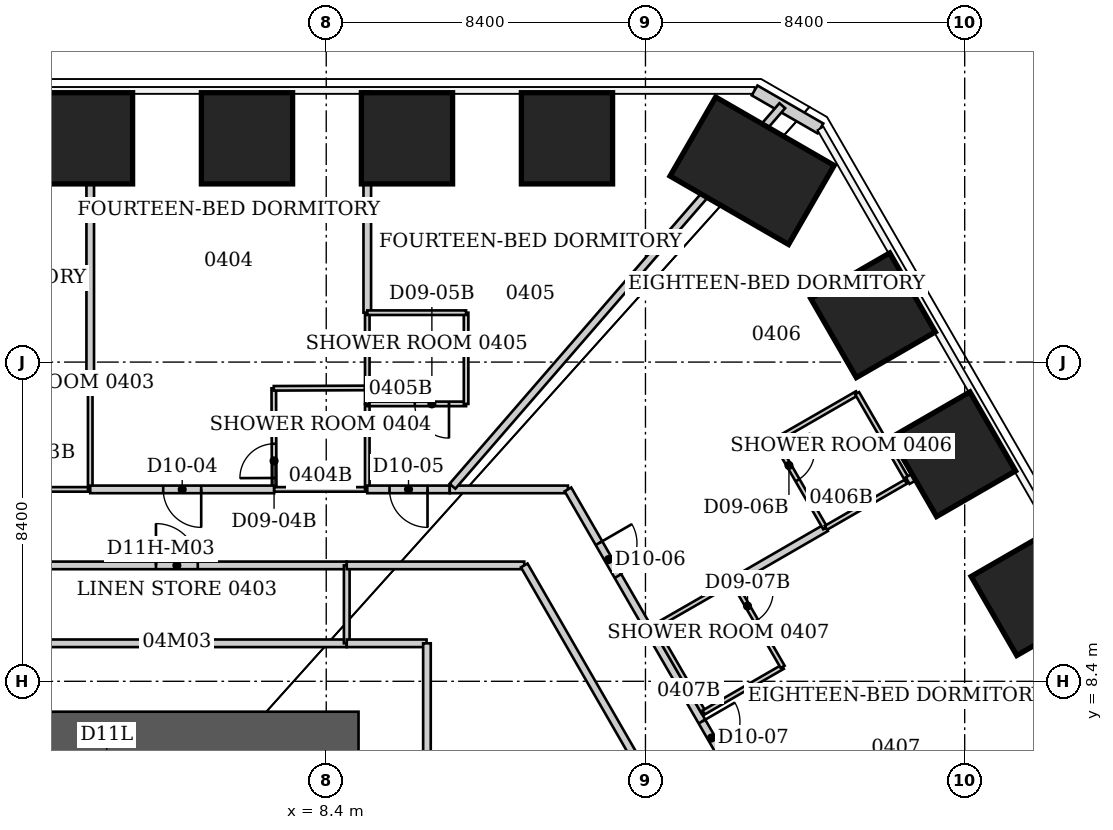
"""IFC4 building model, lengths in metres.
Left out: names, types, materials, properties, quantities, classifications, styles, units other than length and angle.
Written with IfcOpenShell. Run it as: python <this file> out.ifc"""

import sys

from ifc_helpers import new_model, si_unit, direction, frame, frame_2d, origin, origin_2d, place, context, subcontext, project, spatial, rectangle, extrude, element, fill, save


model = new_model("IFC4")
c1 = context("Model", 3, precision=1e-05, world=origin(), true_north=direction((0.0, 1.0)))
c2 = subcontext(c1, "Body", "Model", "MODEL_VIEW")
j1 = project(units=[si_unit("LENGTHUNIT", "METRE"), si_unit("PLANEANGLEUNIT", "RADIAN")], contexts=[c1])
p1 = place(None, origin())
s1 = spatial("IfcSite", under=j1, at=p1, CompositionType="ELEMENT")
p2 = place(p1, origin())
s2 = spatial("IfcBuilding", under=s1, at=p2, CompositionType="ELEMENT")
p3 = place(p2, frame((0.0, 0.0, 23.0)))
s3 = spatial("IfcBuildingStorey", under=s2, at=p3, CompositionType="ELEMENT", Elevation=23.0)
for number, where, z_axis, x_axis in (
    (1, (2.105, 22.689, 0.0), (0.0, 0.0, 1.0), (0.0, 1.0, 0.0)),
    (2, (6.315, 22.689, 0.0), (0.0, 0.0, 1.0), (0.0, 1.0, 0.0)),
    (3, (10.525, 22.689, 0.0), (0.0, 0.0, 1.0), (0.0, 1.0, 0.0)),
    (4, (14.735, 22.689, 0.0), (0.0, 0.0, 1.0), (0.0, 1.0, 0.0)),
):
    element("IfcColumn", number, at=place(p3, frame(where, z_axis=z_axis, x_axis=x_axis)), inside=s3, PredefinedType="COLUMN", context=c2, shape_type="SweptSolid", body=[
        extrude(rectangle(XDim=2.4, YDim=2.4, at=origin_2d()), origin(), (0.0, 0.0, 1.0), 3.8),
    ])
p4 = place(p3, frame((19.606, 21.835, 0.0), z_axis=(0.0, 0.0, 1.0), x_axis=(0.5, 0.866025403784, 0.0)))
e5 = element("IfcColumn", 5, at=p4, inside=s3, PredefinedType="COLUMN", context=c2, shape_type="SweptSolid", body=[
    extrude(rectangle(XDim=2.4, YDim=3.6, at=origin_2d()), origin(), (0.0, 0.0, 1.0), 3.8),
])
for number, where, z_axis, x_axis in (
    (6, (22.788, 18.032, 0.0), (0.0, 0.0, 1.0), (0.866, 0.5, 0.0)),
    (7, (24.899, 14.375, 0.0), (0.0, 0.0, 1.0), (0.866, 0.5, 0.0)),
    (8, (27.01, 10.719, 0.0), (0.0, 0.0, 1.0), (0.866, 0.5, 0.0)),
):
    element("IfcColumn", number, at=place(p3, frame(where, z_axis=z_axis, x_axis=x_axis)), inside=s3, PredefinedType="COLUMN", context=c2, shape_type="SweptSolid", body=[
        extrude(rectangle(XDim=2.4, YDim=2.4, at=origin_2d()), origin(), (0.0, 0.0, 1.0), 3.8),
    ])
p5 = place(p3, frame((-9.25, 6.85, 0.0), z_axis=(0.0, 0.0, 1.0), x_axis=(1.0, 0.0, 0.0)))
e9 = element("IfcWall", 9, at=p5, inside=s3, PredefinedType="SHEAR", context=c2, shape_type="SweptSolid", body=[
    extrude(rectangle(XDim=18.5, YDim=1.5, at=frame_2d((9.25, 0.0))), origin(), (0.0, 0.0, 1.0), 3.8),
])
p6 = place(p3, frame((19.672, 23.949, 0.0), z_axis=(0.0, 0.0, 1.0), x_axis=(0.866010750942, -0.50002537861, 0.0)))
e10 = element("IfcWall", 10, at=p6, inside=s3, PredefinedType="SOLIDWALL", context=c2, shape_type="SweptSolid", body=[
    extrude(rectangle(XDim=2.0, YDim=0.3, at=frame_2d((1.0, 0.0))), origin(), (0.0, 0.0, 1.0), 3.64),
])
p7 = place(p3, frame((0.0, 11.45, 0.0), z_axis=(0.0, 0.0, 1.0), x_axis=(1.0, 0.0, 0.0)))
e11 = element("IfcWall", 11, at=p7, inside=s3, PredefinedType="PARTITIONING", context=c2, shape_type="SweptSolid", body=[
    extrude(rectangle(XDim=8.94, YDim=0.2, at=frame_2d((4.47, 0.0))), origin(), (0.0, 0.0, 1.0), 3.64),
])
p8 = place(p7, frame((3.92, 0.0, 0.0)))
e12 = element("IfcOpeningElement", 12, at=p8, cuts=e11, PredefinedType="OPENING", context=c2, shape_type="SweptSolid", body=[
    extrude(rectangle(XDim=1.1, YDim=2.2, at=frame_2d((0.55, 1.1))), frame((0.0, 0.1, 0.0), z_axis=(0.0, -1.0, 0.0), x_axis=(1.0, 0.0, 0.0)), (0.0, 0.0, 1.0), 0.2),
])
for number, where, z_axis, x_axis in (
    (13, (2.19, 13.45, 0.0), (0.0, 0.0, 1.0), (-1.0, 0.0, 0.0)),
    (14, (2.19, 16.12, 0.0), (0.0, 0.0, 1.0), (-1.0, 0.0, 0.0)),
):
    element("IfcWall", number, at=place(p3, frame(where, z_axis=z_axis, x_axis=x_axis)), inside=s3, PredefinedType="PARTITIONING", context=c2, shape_type="SweptSolid", body=[
        extrude(rectangle(XDim=2.46, YDim=0.12, at=frame_2d((1.23, 0.0))), origin(), (0.0, 0.0, 1.0), 3.64),
    ])
p9 = place(p3, frame((2.19, 16.12, 0.0), z_axis=(0.0, 0.0, 1.0), x_axis=(0.0, -1.0, 0.0)))
e15 = element("IfcWall", 15, at=p9, inside=s3, PredefinedType="PARTITIONING", context=c2, shape_type="SweptSolid", body=[
    extrude(rectangle(XDim=2.67, YDim=0.12, at=frame_2d((1.335, 0.0))), origin(), (0.0, 0.0, 1.0), 2.878),
])
p10 = place(p3, frame((2.19, 23.83, 0.0), z_axis=(0.0, 0.0, 1.0), x_axis=(0.0, -1.0, 0.0)))
e16 = element("IfcWall", 16, at=p10, inside=s3, PredefinedType="PARTITIONING", context=c2, shape_type="SweptSolid", body=[
    extrude(rectangle(XDim=7.71, YDim=0.2, at=frame_2d((3.855, 0.0))), origin(), (0.0, 0.0, 1.0), 2.878),
])
p11 = place(p3, frame((7.02, 16.11, 0.0), z_axis=(0.0, 0.0, 1.0), x_axis=(0.003762822113, -0.99999292056, 0.0)))
e17 = element("IfcWall", 17, at=p11, inside=s3, PredefinedType="PARTITIONING", context=c2, shape_type="SweptSolid", body=[
    extrude(rectangle(XDim=2.66, YDim=0.12, at=frame_2d((1.33, 0.0))), origin(), (0.0, 0.0, 1.0), 3.64),
])
p12 = place(p11, frame((1.46, 0.0, 0.0)))
e18 = element("IfcOpeningElement", 18, at=p12, cuts=e17, PredefinedType="OPENING", context=c2, shape_type="SweptSolid", body=[
    extrude(rectangle(XDim=0.9, YDim=2.03, at=frame_2d((0.45, 1.015))), frame((0.0, 0.06, 0.0), z_axis=(0.0, -1.0, 0.0), x_axis=(1.0, 0.0, 0.0)), (0.0, 0.0, 1.0), 0.12),
])
p13 = place(p3, frame((7.03, 13.45, 0.0), z_axis=(0.0, 0.0, 1.0), x_axis=(-1.0, 0.0, 0.0)))
e19 = element("IfcWall", 19, at=p13, inside=s3, PredefinedType="PARTITIONING", context=c2, shape_type="SweptSolid", body=[
    extrude(rectangle(XDim=4.84, YDim=0.2, at=frame_2d((2.42, 0.0))), origin(), (0.0, 0.0, 1.0), 3.64),
])
p14 = place(p13, frame((1.92, 0.0, 0.0)))
e20 = element("IfcOpeningElement", 20, at=p14, cuts=e19, PredefinedType="OPENING", context=c2, shape_type="SweptSolid", body=[
    extrude(rectangle(XDim=1.0, YDim=2.13, at=frame_2d((0.5, 1.065))), frame((0.0, 0.1, 0.0), z_axis=(0.0, -1.0, 0.0), x_axis=(1.0, 0.0, 0.0)), (0.0, 0.0, 1.0), 0.2),
])
p15 = place(p3, frame((8.94, 9.4, 0.0), z_axis=(0.0, 0.0, 1.0), x_axis=(-1.0, 0.0, 0.0)))
e21 = element("IfcWall", 21, at=p15, inside=s3, PredefinedType="PARTITIONING", context=c2, shape_type="SweptSolid", body=[
    extrude(rectangle(XDim=8.94, YDim=0.2, at=frame_2d((4.47, 0.0))), origin(), (0.0, 0.0, 1.0), 3.64),
])
p16 = place(p3, frame((8.94, 11.45, 0.0), z_axis=(0.0, 0.0, 1.0), x_axis=(0.0, -1.0, 0.0)))
e22 = element("IfcWall", 22, at=p16, inside=s3, PredefinedType="PARTITIONING", context=c2, shape_type="SweptSolid", body=[
    extrude(rectangle(XDim=2.05, YDim=0.15, at=frame_2d((1.025, 0.0))), origin(), (0.0, 0.0, 1.0), 3.64),
])
p17 = place(p3, frame((8.94, 11.45, 0.0), z_axis=(0.0, 0.0, 1.0), x_axis=(1.0, 0.0, 0.0)))
e23 = element("IfcWall", 23, at=p17, inside=s3, PredefinedType="PARTITIONING", context=c2, shape_type="SweptSolid", body=[
    extrude(rectangle(XDim=4.67, YDim=0.2, at=frame_2d((2.335, 0.0))), origin(), (0.0, 0.0, 1.0), 3.64),
])
p18 = place(p3, frame((9.48, 13.45, 0.0), z_axis=(0.0, 0.0, 1.0), x_axis=(-1.0, 0.0, 0.0)))
e24 = element("IfcWall", 24, at=p18, inside=s3, PredefinedType="PARTITIONING", context=c2, shape_type="SweptSolid", body=[
    extrude(rectangle(XDim=2.45, YDim=0.12, at=frame_2d((1.225, 0.0))), origin(), (0.0, 0.0, 1.0), 3.64),
])
p19 = place(p3, frame((9.48, 15.7, 0.0), z_axis=(0.0, 0.0, 1.0), x_axis=(0.0, -1.0, 0.0)))
e25 = element("IfcWall", 25, at=p19, inside=s3, PredefinedType="PARTITIONING", context=c2, shape_type="SweptSolid", body=[
    extrude(rectangle(XDim=2.25, YDim=0.12, at=frame_2d((1.125, 0.0))), origin(), (0.0, 0.0, 1.0), 3.64),
])
p20 = place(p3, frame((9.48, 15.7, 0.0), z_axis=(0.0, 0.0, 1.0), x_axis=(1.0, 0.0, 0.0)))
e26 = element("IfcWall", 26, at=p20, inside=s3, PredefinedType="PARTITIONING", context=c2, shape_type="SweptSolid", body=[
    extrude(rectangle(XDim=2.6, YDim=0.12, at=frame_2d((1.3, 0.0))), origin(), (0.0, 0.0, 1.0), 3.64),
])
p21 = place(p20, frame((1.25, 0.0, 0.0)))
e27 = element("IfcOpeningElement", 27, at=p21, cuts=e26, PredefinedType="OPENING", context=c2, shape_type="SweptSolid", body=[
    extrude(rectangle(XDim=0.9, YDim=2.03, at=frame_2d((0.45, 1.015))), frame((0.0, 0.06, 0.0), z_axis=(0.0, -1.0, 0.0), x_axis=(1.0, 0.0, 0.0)), (0.0, 0.0, 1.0), 0.12),
])
p22 = place(p3, frame((9.48, 16.12, 0.0), z_axis=(0.0, 0.0, 1.0), x_axis=(-0.999991721417, -0.004069041344, 0.0)))
e28 = element("IfcWall", 28, at=p22, inside=s3, PredefinedType="PARTITIONING", context=c2, shape_type="SweptSolid", body=[
    extrude(rectangle(XDim=2.46, YDim=0.12, at=frame_2d((1.23, 0.0))), origin(), (0.0, 0.0, 1.0), 3.64),
])
p23 = place(p3, frame((9.48, 16.12, 0.0), z_axis=(0.0, 0.0, 1.0), x_axis=(0.0, -1.0, 0.0)))
e29 = element("IfcWall", 29, at=p23, inside=s3, PredefinedType="PARTITIONING", context=c2, shape_type="SweptSolid", body=[
    extrude(rectangle(XDim=0.42, YDim=0.12, at=frame_2d((0.21, 0.0))), origin(), (0.0, 0.0, 1.0), 3.64),
])
p24 = place(p3, frame((9.48, 18.1, 0.0), z_axis=(0.0, 0.0, 1.0), x_axis=(0.0, -1.0, 0.0)))
e30 = element("IfcWall", 30, at=p24, inside=s3, PredefinedType="PARTITIONING", context=c2, shape_type="SweptSolid", body=[
    extrude(rectangle(XDim=1.98, YDim=0.12, at=frame_2d((0.99, 0.0))), origin(), (0.0, 0.0, 1.0), 3.64),
])
p25 = place(p3, frame((9.48, 23.92, 0.0), z_axis=(0.0, 0.0, 1.0), x_axis=(0.0, -1.0, 0.0)))
e31 = element("IfcWall", 31, at=p25, inside=s3, PredefinedType="PARTITIONING", context=c2, shape_type="SweptSolid", body=[
    extrude(rectangle(XDim=5.82, YDim=0.2, at=frame_2d((2.91, 0.0))), origin(), (0.0, 0.0, 1.0), 3.64),
])
p26 = place(p3, frame((11.04, 9.4, 0.0), z_axis=(0.0, 0.0, 1.0), x_axis=(-1.0, 0.0, 0.0)))
e32 = element("IfcWall", 32, at=p26, inside=s3, PredefinedType="PARTITIONING", context=c2, shape_type="SweptSolid", body=[
    extrude(rectangle(XDim=2.1, YDim=0.2, at=frame_2d((1.05, 0.0))), origin(), (0.0, 0.0, 1.0), 3.64),
])
p27 = place(p3, frame((11.05, -7.76, 0.0), z_axis=(0.0, 0.0, 1.0), x_axis=(0.0, 1.0, 0.0)))
e33 = element("IfcWall", 33, at=p27, inside=s3, PredefinedType="PARTITIONING", context=c2, shape_type="SweptSolid", body=[
    extrude(rectangle(XDim=17.16, YDim=0.2, at=frame_2d((8.58, 0.0))), origin(), (0.0, 0.0, 1.0), 3.64),
])
p28 = place(p27, frame((8.03, 0.0, 0.0)))
e34 = element("IfcOpeningElement", 34, at=p28, cuts=e33, PredefinedType="OPENING", context=c2, shape_type="SweptSolid", body=[
    extrude(rectangle(XDim=1.1, YDim=2.2, at=frame_2d((0.55, 1.1))), frame((0.0, 0.1, 0.0), z_axis=(0.0, -1.0, 0.0), x_axis=(1.0, 0.0, 0.0)), (0.0, 0.0, 1.0), 0.2),
])
p29 = place(p3, frame((11.65, 13.45, 0.0), z_axis=(0.0, 0.0, 1.0), x_axis=(-1.0, 0.0, 0.0)))
e35 = element("IfcWall", 35, at=p29, inside=s3, PredefinedType="PARTITIONING", context=c2, shape_type="SweptSolid", body=[
    extrude(rectangle(XDim=2.17, YDim=0.2, at=frame_2d((1.085, 0.0))), origin(), (0.0, 0.0, 1.0), 3.64),
])
p30 = place(p29, frame((0.585, 0.0, 0.0)))
e36 = element("IfcOpeningElement", 36, at=p30, cuts=e35, PredefinedType="OPENING", context=c2, shape_type="SweptSolid", body=[
    extrude(rectangle(XDim=1.0, YDim=2.13, at=frame_2d((0.5, 1.065))), frame((0.0, 0.1, 0.0), z_axis=(0.0, -1.0, 0.0), x_axis=(1.0, 0.0, 0.0)), (0.0, 0.0, 1.0), 0.2),
])
p31 = place(p3, frame((12.08, 15.7, 0.0), z_axis=(0.0, 0.0, 1.0), x_axis=(0.0, 1.0, 0.0)))
e37 = element("IfcWall", 37, at=p31, inside=s3, PredefinedType="PARTITIONING", context=c2, shape_type="SweptSolid", body=[
    extrude(rectangle(XDim=2.4, YDim=0.12, at=frame_2d((1.2, 0.0))), origin(), (0.0, 0.0, 1.0), 3.64),
])
p32 = place(p3, frame((12.08, 18.1, 0.0), z_axis=(0.0, 0.0, 1.0), x_axis=(-1.0, 0.0, 0.0)))
e38 = element("IfcWall", 38, at=p32, inside=s3, PredefinedType="PARTITIONING", context=c2, shape_type="SweptSolid", body=[
    extrude(rectangle(XDim=2.6, YDim=0.12, at=frame_2d((1.3, 0.0))), origin(), (0.0, 0.0, 1.0), 3.64),
])
p33 = place(p3, frame((13.61, 11.45, 0.0), z_axis=(0.0, 0.0, 1.0), x_axis=(0.499402776741, -0.866369936334, 0.0)))
e39 = element("IfcWall", 39, at=p33, inside=s3, PredefinedType="PARTITIONING", context=c2, shape_type="SweptSolid", body=[
    extrude(rectangle(XDim=8.53, YDim=0.2, at=frame_2d((4.265, 0.0))), origin(), (0.0, 0.0, 1.0), 3.64),
])
p34 = place(p3, frame((14.76, 13.45, 0.0), z_axis=(0.0, 0.0, 1.0), x_axis=(-1.0, 0.0, 0.0)))
e40 = element("IfcWall", 40, at=p34, inside=s3, PredefinedType="PARTITIONING", context=c2, shape_type="SweptSolid", body=[
    extrude(rectangle(XDim=3.11, YDim=0.2, at=frame_2d((1.555, 0.0))), origin(), (0.0, 0.0, 1.0), 3.64),
])
p35 = place(p3, frame((14.76, 13.45, 0.0), z_axis=(0.0, 0.0, 1.0), x_axis=(0.499894213467, -0.866086471054, 0.0)))
e41 = element("IfcWall", 41, at=p35, inside=s3, PredefinedType="PARTITIONING", context=c2, shape_type="SweptSolid", body=[
    extrude(rectangle(XDim=4.266, YDim=0.2, at=frame_2d((2.133, 0.0))), origin(), (0.0, 0.0, 1.0), 3.64),
])
p36 = place(p35, frame((1.633, 0.0, 0.0)))
e42 = element("IfcOpeningElement", 42, at=p36, cuts=e41, PredefinedType="OPENING", context=c2, shape_type="SweptSolid", body=[
    extrude(rectangle(XDim=1.0, YDim=2.13, at=frame_2d((0.5, 1.065))), frame((0.0, 0.1, 0.0), z_axis=(0.0, -1.0, 0.0), x_axis=(1.0, 0.0, 0.0)), (0.0, 0.0, 1.0), 0.2),
])
p37 = place(p3, frame((16.892, 9.756, 0.0), z_axis=(0.0, 0.0, 1.0), x_axis=(0.499916344562, -0.866073696887, 0.0)))
e43 = element("IfcWall", 43, at=p37, inside=s3, PredefinedType="PARTITIONING", context=c2, shape_type="SweptSolid", body=[
    extrude(rectangle(XDim=6.576, YDim=0.2, at=frame_2d((3.288, 0.0))), origin(), (0.0, 0.0, 1.0), 3.64),
])
p38 = place(p37, frame((2.788, 0.0, 0.0)))
e44 = element("IfcOpeningElement", 44, at=p38, cuts=e43, PredefinedType="OPENING", context=c2, shape_type="SweptSolid", body=[
    extrude(rectangle(XDim=1.0, YDim=2.13, at=frame_2d((0.5, 1.065))), frame((0.0, 0.1, 0.0), z_axis=(0.0, -1.0, 0.0), x_axis=(1.0, 0.0, 0.0)), (0.0, 0.0, 1.0), 0.2),
])
p39 = place(p3, frame((16.904, 9.762, 0.0), z_axis=(0.0, 0.0, 1.0), x_axis=(0.875926787791, 0.482444051088, 0.0)))
e45 = element("IfcWall", 45, at=p39, inside=s3, PredefinedType="PARTITIONING", context=c2, shape_type="SweptSolid", body=[
    extrude(rectangle(XDim=0.143, YDim=0.2, at=frame_2d((0.071, 0.0))), origin(), (0.0, 0.0, 1.0), 3.64),
])
p40 = place(p3, frame((17.028, 9.834, 0.0), z_axis=(0.0, 0.0, 1.0), x_axis=(0.867064427496, 0.498196024242, 0.0)))
e46 = element("IfcWall", 46, at=p40, inside=s3, PredefinedType="PARTITIONING", context=c2, shape_type="SweptSolid", body=[
    extrude(rectangle(XDim=2.401, YDim=0.12, at=frame_2d((1.201, 0.0))), origin(), (0.0, 0.0, 1.0), 2.86),
])
p41 = place(p3, frame((17.03, 9.83, 0.0), z_axis=(0.0, 0.0, 1.0), x_axis=(0.500291685314, -0.865856933682, 0.0)))
e47 = element("IfcWall", 47, at=p41, inside=s3, PredefinedType="PARTITIONING", context=c2, shape_type="SweptSolid", body=[
    extrude(rectangle(XDim=2.599, YDim=0.12, at=frame_2d((1.299, 0.0))), origin(), (0.0, 0.0, 1.0), 3.64),
])
p42 = place(p3, frame((18.33, 7.58, 0.0), z_axis=(0.0, 0.0, 1.0), x_axis=(0.866177122335, 0.499737123639, 0.0)))
e48 = element("IfcWall", 48, at=p42, inside=s3, PredefinedType="PARTITIONING", context=c2, shape_type="SweptSolid", body=[
    extrude(rectangle(XDim=2.401, YDim=0.12, at=frame_2d((1.201, 0.0))), origin(), (0.0, 0.0, 1.0), 3.64),
])
p43 = place(p3, frame((19.11, 11.03, 0.0), z_axis=(0.0, 0.0, 1.0), x_axis=(0.865839219242, 0.500322342518, 0.0)))
e49 = element("IfcWall", 49, at=p43, inside=s3, PredefinedType="PARTITIONING", context=c2, shape_type="SweptSolid", body=[
    extrude(rectangle(XDim=2.818, YDim=0.2, at=frame_2d((1.409, 0.0))), origin(), (0.0, 0.0, 1.0), 2.86),
])
p44 = place(p3, frame((20.2, 14.73, 0.0), z_axis=(0.0, 0.0, 1.0), x_axis=(0.500605174168, -0.865675724273, 0.0)))
e50 = element("IfcWall", 50, at=p44, inside=s3, PredefinedType="PARTITIONING", context=c2, shape_type="SweptSolid", body=[
    extrude(rectangle(XDim=2.657, YDim=0.12, at=frame_2d((1.329, 0.0))), origin(), (0.0, 0.0, 1.0), 3.64),
])
p45 = place(p44, frame((0.3, 0.0, 0.0)))
e51 = element("IfcOpeningElement", 51, at=p45, cuts=e50, PredefinedType="OPENING", context=c2, shape_type="SweptSolid", body=[
    extrude(rectangle(XDim=0.9, YDim=2.03, at=frame_2d((0.45, 1.015))), frame((0.0, 0.06, 0.0), z_axis=(0.0, -1.0, 0.0), x_axis=(1.0, 0.0, 0.0)), (0.0, 0.0, 1.0), 0.12),
])
p46 = place(p3, frame((20.4, 23.547, 0.0), z_axis=(0.0, 0.0, 1.0), x_axis=(-0.654899675326, -0.7557158297, 0.0)))
e52 = element("IfcWall", 52, at=p46, inside=s3, PredefinedType="PARTITIONING", context=c2, shape_type="SweptSolid", body=[
    extrude(rectangle(XDim=13.251, YDim=0.2, at=frame_2d((6.625, 0.0))), origin(), (0.0, 0.0, 1.0), 3.64),
])
p47 = place(p3, frame((20.41, 8.78, 0.0), z_axis=(0.0, 0.0, 1.0), x_axis=(-0.500291685314, 0.865856933682, 0.0)))
e53 = element("IfcWall", 53, at=p47, inside=s3, PredefinedType="PARTITIONING", context=c2, shape_type="SweptSolid", body=[
    extrude(rectangle(XDim=2.599, YDim=0.12, at=frame_2d((1.299, 0.0))), origin(), (0.0, 0.0, 1.0), 3.64),
])
p48 = place(p47, frame((1.399, 0.0, 0.0)))
e54 = element("IfcOpeningElement", 54, at=p48, cuts=e53, PredefinedType="OPENING", context=c2, shape_type="SweptSolid", body=[
    extrude(rectangle(XDim=0.9, YDim=2.03, at=frame_2d((0.45, 1.015))), frame((0.0, 0.06, 0.0), z_axis=(0.0, -1.0, 0.0), x_axis=(1.0, 0.0, 0.0)), (0.0, 0.0, 1.0), 0.12),
])
p49 = place(p3, frame((21.55, 12.44, 0.0), z_axis=(0.0, 0.0, 1.0), x_axis=(0.866244536399, 0.499620258956, 0.0)))
e55 = element("IfcWall", 55, at=p49, inside=s3, PredefinedType="PARTITIONING", context=c2, shape_type="SweptSolid", body=[
    extrude(rectangle(XDim=2.482, YDim=0.12, at=frame_2d((1.241, 0.0))), origin(), (0.0, 0.0, 1.0), 2.86),
])
p50 = place(p3, frame((22.37, 15.98, 0.0), z_axis=(0.0, 0.0, 1.0), x_axis=(-0.86653430447, -0.499117520406, 0.0)))
e56 = element("IfcWall", 56, at=p50, inside=s3, PredefinedType="PARTITIONING", context=c2, shape_type="SweptSolid", body=[
    extrude(rectangle(XDim=2.504, YDim=0.12, at=frame_2d((1.252, 0.0))), origin(), (0.0, 0.0, 1.0), 3.64),
])
p51 = place(p3, frame((23.7, 13.68, 0.0), z_axis=(0.0, 0.0, 1.0), x_axis=(-0.500605174168, 0.865675724273, 0.0)))
e57 = element("IfcWall", 57, at=p51, inside=s3, PredefinedType="PARTITIONING", context=c2, shape_type="SweptSolid", body=[
    extrude(rectangle(XDim=2.657, YDim=0.12, at=frame_2d((1.329, 0.0))), origin(), (0.0, 0.0, 1.0), 3.64),
])
p52 = place(p3, frame((23.7, 13.68, 0.0), z_axis=(0.0, 0.0, 1.0), x_axis=(0.864733482606, 0.502231026581, 0.0)))
e58 = element("IfcWall", 58, at=p52, inside=s3, PredefinedType="PARTITIONING", context=c2, shape_type="SweptSolid", body=[
    extrude(rectangle(XDim=2.528, YDim=0.2, at=frame_2d((1.264, 0.0))), origin(), (0.0, 0.0, 1.0), 3.64),
])
p53 = place(p14, origin())
e59 = element("IfcDoor", 59, at=p53, inside=s3, OperationType="SINGLE_SWING_LEFT", PredefinedType="DOOR", context=c2, shape_type="SweptSolid", body=[
    extrude(rectangle(XDim=1.0, YDim=2.13, at=frame_2d((0.5, 1.065))), frame((0.0, 0.025, 0.0), z_axis=(0.0, -1.0, 0.0), x_axis=(1.0, 0.0, 0.0)), (0.0, 0.0, 1.0), 0.05),
])
fill(e20, e59)
p54 = place(p12, origin())
e60 = element("IfcDoor", 60, at=p54, inside=s3, OperationType="SINGLE_SWING_RIGHT", PredefinedType="DOOR", context=c2, shape_type="SweptSolid", body=[
    extrude(rectangle(XDim=0.9, YDim=2.03, at=frame_2d((0.45, 1.015))), frame((0.0, 0.025, 0.0), z_axis=(0.0, -1.0, 0.0), x_axis=(1.0, 0.0, 0.0)), (0.0, 0.0, 1.0), 0.05),
])
fill(e18, e60)
p55 = place(p30, origin())
e61 = element("IfcDoor", 61, at=p55, inside=s3, OperationType="SINGLE_SWING_LEFT", PredefinedType="DOOR", context=c2, shape_type="SweptSolid", body=[
    extrude(rectangle(XDim=1.0, YDim=2.13, at=frame_2d((0.5, 1.065))), frame((0.0, 0.025, 0.0), z_axis=(0.0, -1.0, 0.0), x_axis=(1.0, 0.0, 0.0)), (0.0, 0.0, 1.0), 0.05),
])
fill(e36, e61)
p56 = place(p21, origin())
e62 = element("IfcDoor", 62, at=p56, inside=s3, OperationType="SINGLE_SWING_RIGHT", PredefinedType="DOOR", context=c2, shape_type="SweptSolid", body=[
    extrude(rectangle(XDim=0.9, YDim=2.03, at=frame_2d((0.45, 1.015))), frame((0.0, 0.025, 0.0), z_axis=(0.0, -1.0, 0.0), x_axis=(1.0, 0.0, 0.0)), (0.0, 0.0, 1.0), 0.05),
])
fill(e27, e62)
p57 = place(p36, origin())
e63 = element("IfcDoor", 63, at=p57, inside=s3, OperationType="SINGLE_SWING_LEFT", PredefinedType="DOOR", context=c2, shape_type="SweptSolid", body=[
    extrude(rectangle(XDim=1.0, YDim=2.13, at=frame_2d((0.5, 1.065))), frame((0.0, 0.025, 0.0), z_axis=(0.0, -1.0, 0.0), x_axis=(1.0, 0.0, 0.0)), (0.0, 0.0, 1.0), 0.05),
])
fill(e42, e63)
p58 = place(p45, origin())
e64 = element("IfcDoor", 64, at=p58, inside=s3, OperationType="SINGLE_SWING_LEFT", PredefinedType="DOOR", context=c2, shape_type="SweptSolid", body=[
    extrude(rectangle(XDim=0.9, YDim=2.03, at=frame_2d((0.45, 1.015))), frame((0.0, 0.025, 0.0), z_axis=(0.0, -1.0, 0.0), x_axis=(1.0, 0.0, 0.0)), (0.0, 0.0, 1.0), 0.05),
])
fill(e51, e64)
p59 = place(p38, origin())
e65 = element("IfcDoor", 65, at=p59, inside=s3, OperationType="SINGLE_SWING_LEFT", PredefinedType="DOOR", context=c2, shape_type="SweptSolid", body=[
    extrude(rectangle(XDim=1.0, YDim=2.13, at=frame_2d((0.5, 1.065))), frame((0.0, 0.025, 0.0), z_axis=(0.0, -1.0, 0.0), x_axis=(1.0, 0.0, 0.0)), (0.0, 0.0, 1.0), 0.05),
])
fill(e44, e65)
p60 = place(p48, origin())
e66 = element("IfcDoor", 66, at=p60, inside=s3, OperationType="SINGLE_SWING_RIGHT", PredefinedType="DOOR", context=c2, shape_type="SweptSolid", body=[
    extrude(rectangle(XDim=0.9, YDim=2.03, at=frame_2d((0.45, 1.015))), frame((0.0, 0.025, 0.0), z_axis=(0.0, -1.0, 0.0), x_axis=(1.0, 0.0, 0.0)), (0.0, 0.0, 1.0), 0.05),
])
fill(e54, e66)
p61 = place(p8, origin())
e67 = element("IfcDoor", 67, at=p61, inside=s3, OperationType="SINGLE_SWING_LEFT", PredefinedType="DOOR", context=c2, shape_type="SweptSolid", body=[
    extrude(rectangle(XDim=1.1, YDim=2.2, at=frame_2d((0.55, 1.1))), frame((0.0, 0.025, 0.0), z_axis=(0.0, -1.0, 0.0), x_axis=(1.0, 0.0, 0.0)), (0.0, 0.0, 1.0), 0.05),
])
fill(e12, e67)
save(model, sys.argv[1])
